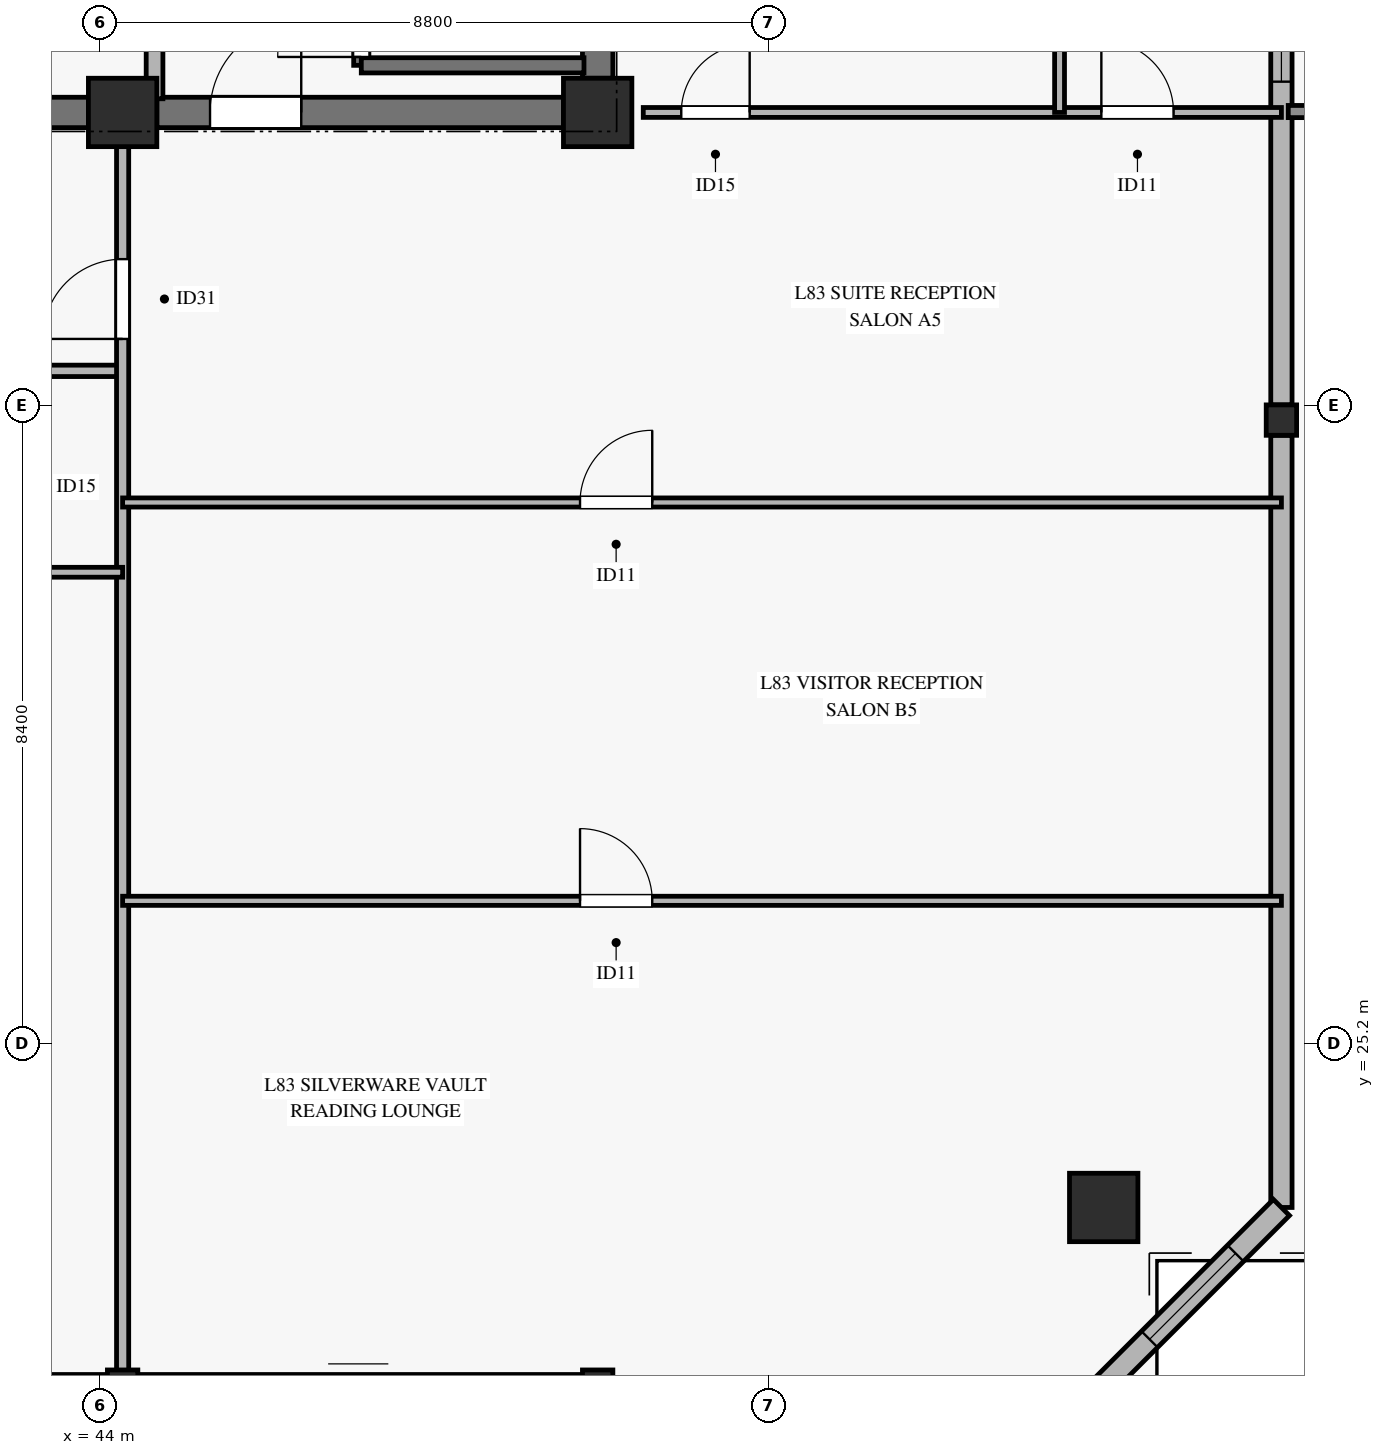
"""IFC4 building model, lengths in metres.
Left out: names, types, materials, properties, quantities, classifications, styles, units other than length and angle.
Written with IfcOpenShell. Run it as: python <this file> out.ifc"""

import sys

from ifc_helpers import new_model, si_unit, direction, frame, frame_2d, origin, origin_2d, place, context, subcontext, project, spatial, rectangle, hollow_rectangle, extrude, source, transform, mapped, element, fill, save


model = new_model("IFC4")
c1 = context("Model", 3, precision=1e-05, world=origin(), true_north=direction((0.0, 1.0)))
c2 = subcontext(c1, "Body", "Model", "MODEL_VIEW")
j1 = project(units=[si_unit("LENGTHUNIT", "METRE"), si_unit("PLANEANGLEUNIT", "RADIAN")], contexts=[c1])
p1 = place(None, origin())
s1 = spatial("IfcSite", under=j1, at=p1, CompositionType="ELEMENT")
p2 = place(p1, origin())
s2 = spatial("IfcBuilding", under=s1, at=p2, CompositionType="ELEMENT")
p3 = place(p2, frame((0.0, 0.0, 321.0)))
s3 = spatial("IfcBuildingStorey", under=s2, at=p3, CompositionType="ELEMENT", Elevation=321.0)
m1 = source(origin(), c2, "Body", "SweptSolid", [
    extrude(rectangle(XDim=0.9, YDim=0.9, at=origin_2d()), origin(), (0.0, 0.0, 1.0), 3.185),
])
for number, where, z_axis, x_axis in (
    (1, (44.3, 37.45, 0.0), (0.0, 0.0, 1.0), (1.0, 0.0, 0.0)),
    (2, (50.55, 37.45, 0.0), (0.0, 0.0, 1.0), (1.0, 0.0, 0.0)),
):
    element("IfcColumn", number, at=place(p3, frame(where, z_axis=z_axis, x_axis=x_axis)), inside=s3, PredefinedType="PILASTER", context=c2, shape_type="MappedRepresentation", body=[
        mapped(m1, transform((0.0, 0.0, 0.0), x_axis=(1.0, 0.0, 0.0), y_axis=(0.0, 1.0, 0.0), z_axis=(0.0, 0.0, 1.0), scale=1.0)),
    ])
p4 = place(p3, frame((36.05, 37.45, 0.0), z_axis=(0.0, 0.0, 1.0), x_axis=(1.0, 0.0, 0.0)))
e3 = element("IfcWall", 3, at=p4, inside=s3, PredefinedType="SHEAR", context=c2, shape_type="SweptSolid", body=[
    extrude(rectangle(XDim=7.8, YDim=0.4, at=frame_2d((3.9, 0.0))), origin(), (0.0, 0.0, 1.0), 3.185),
])
p5 = place(p3, frame((44.75, 37.45, 0.0), z_axis=(0.0, 0.0, 1.0), x_axis=(1.0, 0.0, 0.0)))
e4 = element("IfcWall", 4, at=p5, inside=s3, PredefinedType="SHEAR", context=c2, shape_type="SweptSolid", body=[
    extrude(rectangle(XDim=5.35, YDim=0.4, at=frame_2d((2.675, 0.0))), origin(), (0.0, 0.0, 1.0), 3.185),
])
p6 = place(p5, frame((0.7, 0.0, 0.0)))
e5 = element("IfcOpeningElement", 5, at=p6, cuts=e4, PredefinedType="OPENING", context=c2, shape_type="SweptSolid", body=[
    extrude(rectangle(XDim=1.2, YDim=2.15, at=frame_2d((0.6, 1.075))), frame((0.0, 0.21, 0.0), z_axis=(0.0, -1.0, 0.0), x_axis=(1.0, 0.0, 0.0)), (0.0, 0.0, 1.0), 0.42),
])
p7 = place(p3, frame((50.55, 37.9, 0.0), z_axis=(0.0, 0.0, 1.0), x_axis=(0.0, 1.0, 0.0)))
e6 = element("IfcWall", 6, at=p7, inside=s3, PredefinedType="SHEAR", context=c2, shape_type="SweptSolid", body=[
    extrude(rectangle(XDim=8.2, YDim=0.4, at=frame_2d((4.1, 0.0))), origin(), (0.0, 0.0, 1.0), 3.185),
])
m2 = source(origin(), c2, "Body", "SweptSolid", [
    extrude(hollow_rectangle(XDim=0.9, YDim=0.9, WallThickness=0.04, at=origin_2d()), origin(), (0.0, 0.0, 1.0), 3.326),
])
p8 = place(p3, frame((57.208, 23.042, 0.0), z_axis=(-0.110896020197, 0.266341268892, 0.957478146586), x_axis=(-0.92317473482, -0.384380552305, 0.0)))
e7 = element("IfcColumn", 7, at=p8, inside=s3, PredefinedType="COLUMN", context=c2, shape_type="MappedRepresentation", body=[
    mapped(m2, transform((0.0, 0.0, 0.0), x_axis=(1.0, 0.0, 0.0), y_axis=(0.0, 1.0, 0.0), z_axis=(0.0, 0.0, 1.0), scale=1.0)),
])
m3 = source(origin(), c2, "Body", "SweptSolid", [
    extrude(hollow_rectangle(XDim=0.4, YDim=0.4, WallThickness=0.02, at=origin_2d()), origin(), (0.0, 0.0, 1.0), 3.319),
])
for number, where, z_axis, x_axis in (
    (8, (44.3, 20.704, 0.0), (0.0, 0.281, 0.96), (-1.0, 0.0, 0.0)),
    (9, (50.55, 20.704, 0.0), (0.0, 0.281, 0.96), (-1.0, 0.0, 0.0)),
):
    element("IfcColumn", number, at=place(p3, frame(where, z_axis=z_axis, x_axis=x_axis)), inside=s3, PredefinedType="COLUMN", context=c2, shape_type="MappedRepresentation", body=[
        mapped(m3, transform((0.0, 0.0, 0.0), x_axis=(1.0, 0.0, 0.0), y_axis=(0.0, 1.0, 0.0), z_axis=(0.0, 0.0, 1.0), scale=1.0)),
    ])
m4 = source(origin(), c2, "Body", "SweptSolid", [
    extrude(hollow_rectangle(XDim=0.4, YDim=0.4, WallThickness=0.02, at=origin_2d()), origin(), (0.0, 0.0, 1.0), 3.246),
])
p9 = place(p3, frame((59.546, 33.402, 0.0), z_axis=(-0.127803916057, 0.143525527862, 0.981359557906), x_axis=(-0.746825952664, -0.665019545899, 0.0)))
e10 = element("IfcColumn", 10, at=p9, inside=s3, PredefinedType="COLUMN", context=c2, shape_type="MappedRepresentation", body=[
    mapped(m4, transform((0.0, 0.0, 0.0), x_axis=(1.0, 0.0, 0.0), y_axis=(0.0, 1.0, 0.0), z_axis=(0.0, 0.0, 1.0), scale=1.0)),
])
p10 = place(p3, frame((37.75, 20.704, 0.0), z_axis=(0.0, 0.0, 1.0), x_axis=(1.0, 0.0, 0.0)))
e11 = element("IfcWall", 11, at=p10, inside=s3, PredefinedType="SOLIDWALL", context=c2, shape_type="SweptSolid", body=[
    extrude(rectangle(XDim=6.35, YDim=0.28, at=frame_2d((3.175, 0.0))), origin(), (0.0, 0.0, 1.0), 2.815),
])
p11 = place(p3, frame((44.5, 20.704, 0.0), z_axis=(0.0, 0.0, 1.0), x_axis=(1.0, 0.0, 0.0)))
e12 = element("IfcWall", 12, at=p11, inside=s3, PredefinedType="SOLIDWALL", context=c2, shape_type="SweptSolid", body=[
    extrude(rectangle(XDim=5.85, YDim=0.28, at=frame_2d((2.925, 0.0))), origin(), (0.0, 0.0, 1.0), 2.815),
])
p12 = place(p11, frame((2.0, 0.0, 0.0)))
e13 = element("IfcOpeningElement", 13, at=p12, cuts=e12, PredefinedType="OPENING", context=c2, shape_type="SweptSolid", body=[
    extrude(rectangle(XDim=1.8, YDim=2.25, at=frame_2d((0.9, 1.125))), frame((0.0, 0.15, 0.0), z_axis=(0.0, -1.0, 0.0), x_axis=(1.0, 0.0, 0.0)), (0.0, 0.0, 1.0), 0.3),
])
p13 = place(p3, frame((59.546, 23.042, 0.0), z_axis=(0.0, 0.0, 1.0), x_axis=(0.0, 1.0, 0.0)))
e14 = element("IfcWall", 14, at=p13, inside=s3, PredefinedType="SOLIDWALL", context=c2, shape_type="SweptSolid", body=[
    extrude(rectangle(XDim=10.16, YDim=0.28, at=frame_2d((5.08, 0.0))), origin(), (0.0, 0.0, 1.0), 2.815),
])
p14 = place(p3, frame((59.546, 33.602, 0.0), z_axis=(0.0, 0.0, 1.0), x_axis=(0.0, 1.0, 0.0)))
e15 = element("IfcWall", 15, at=p14, inside=s3, PredefinedType="SOLIDWALL", context=c2, shape_type="SweptSolid", body=[
    extrude(rectangle(XDim=10.16, YDim=0.28, at=frame_2d((5.08, 0.0))), origin(), (0.0, 0.0, 1.0), 2.815),
])
p15 = place(p14, frame((4.253, 0.0, 0.45)))
e16 = element("IfcOpeningElement", 16, at=p15, cuts=e15, PredefinedType="OPENING", context=c2, shape_type="SweptSolid", body=[
    extrude(rectangle(XDim=2.2, YDim=2.1, at=frame_2d((1.1, 1.05))), frame((0.0, 0.15, 0.0), z_axis=(0.0, -1.0, 0.0), x_axis=(1.0, 0.0, 0.0)), (0.0, 0.0, 1.0), 0.3),
])
p16 = place(p3, frame((57.208, 20.704, 0.0), z_axis=(0.0, 0.0, 1.0), x_axis=(0.707106781187, 0.707106781187, 0.0)))
e17 = element("IfcWall", 17, at=p16, inside=s3, PredefinedType="SOLIDWALL", context=c2, shape_type="SweptSolid", body=[
    extrude(rectangle(XDim=3.306, YDim=0.3, at=frame_2d((1.653, 0.0))), origin(), (0.0, 0.0, 1.0), 2.815),
])
p17 = place(p16, frame((0.853, 0.0, 0.45)))
e18 = element("IfcOpeningElement", 18, at=p17, cuts=e17, PredefinedType="OPENING", context=c2, shape_type="SweptSolid", body=[
    extrude(rectangle(XDim=1.6, YDim=2.0, at=frame_2d((0.8, 1.0))), frame((0.0, 0.16, 0.0), z_axis=(0.0, -1.0, 0.0), x_axis=(1.0, 0.0, 0.0)), (0.0, 0.0, 1.0), 0.32),
])
p18 = place(p3, frame((47.44, 38.07, 0.0), z_axis=(0.0, 0.0, 1.0), x_axis=(0.0, 1.0, 0.0)))
e19 = element("IfcWall", 19, at=p18, inside=s3, PredefinedType="SOLIDWALL", context=c2, shape_type="SweptSolid", body=[
    extrude(rectangle(XDim=7.25, YDim=0.2, at=frame_2d((3.625, 0.0))), origin(), (0.0, 0.0, 1.0), 3.4),
])
p19 = place(p18, frame((0.11, 0.0, 0.0)))
e20 = element("IfcOpeningElement", 20, at=p19, cuts=e19, PredefinedType="OPENING", context=c2, shape_type="SweptSolid", body=[
    extrude(rectangle(XDim=1.1, YDim=2.15, at=frame_2d((0.55, 1.075))), frame((0.0, 0.11, 0.0), z_axis=(0.0, -1.0, 0.0), x_axis=(1.0, 0.0, 0.0)), (0.0, 0.0, 1.0), 0.22),
])
p20 = place(p3, frame((47.44, 38.07, 0.0), z_axis=(0.0, 0.0, 1.0), x_axis=(1.0, 0.0, 0.0)))
e21 = element("IfcWall", 21, at=p20, inside=s3, PredefinedType="SOLIDWALL", context=c2, shape_type="SweptSolid", body=[
    extrude(rectangle(XDim=2.93, YDim=0.2, at=frame_2d((1.465, 0.0))), origin(), (0.0, 0.0, 1.0), 3.4),
])
p21 = place(p3, frame((44.72, 37.63, 0.0), z_axis=(0.0, 0.0, 1.0), x_axis=(0.0, 1.0, 0.0)))
e22 = element("IfcWall", 22, at=p21, inside=s3, PredefinedType="SOLIDWALL", context=c2, shape_type="SweptSolid", body=[
    extrude(rectangle(XDim=7.59, YDim=0.22, at=frame_2d((3.795, 0.0))), origin(), (0.0, 0.0, 1.0), 3.185),
])
p22 = place(p3, frame((23.4, 34.05, 0.0), z_axis=(0.0, 0.0, 1.0), x_axis=(1.0, 0.0, 0.0)))
e23 = element("IfcWall", 23, at=p22, inside=s3, PredefinedType="PARTITIONING", context=c2, shape_type="SweptSolid", body=[
    extrude(rectangle(XDim=20.9, YDim=0.15, at=frame_2d((10.45, 0.0))), origin(), (0.0, 0.0, 1.0), 2.47),
])
p23 = place(p22, frame((3.275, 0.0, 0.0)))
e24 = element("IfcOpeningElement", 24, at=p23, cuts=e23, PredefinedType="OPENING", context=c2, shape_type="SweptSolid", body=[
    extrude(rectangle(XDim=1.05, YDim=2.15, at=frame_2d((0.525, 1.075))), frame((0.0, 0.085, 0.0), z_axis=(0.0, -1.0, 0.0), x_axis=(1.0, 0.0, 0.0)), (0.0, 0.0, 1.0), 0.17),
])
p24 = place(p22, frame((10.775, 0.0, 0.0)))
e25 = element("IfcOpeningElement", 25, at=p24, cuts=e23, PredefinedType="OPENING", context=c2, shape_type="SweptSolid", body=[
    extrude(rectangle(XDim=1.05, YDim=2.15, at=frame_2d((0.525, 1.075))), frame((0.0, 0.085, 0.0), z_axis=(0.0, -1.0, 0.0), x_axis=(1.0, 0.0, 0.0)), (0.0, 0.0, 1.0), 0.17),
])
p25 = place(p22, frame((17.525, 0.0, 0.0)))
e26 = element("IfcOpeningElement", 26, at=p25, cuts=e23, PredefinedType="OPENING", context=c2, shape_type="SweptSolid", body=[
    extrude(rectangle(XDim=1.05, YDim=2.15, at=frame_2d((0.525, 1.075))), frame((0.0, 0.085, 0.0), z_axis=(0.0, -1.0, 0.0), x_axis=(1.0, 0.0, 0.0)), (0.0, 0.0, 1.0), 0.17),
])
p26 = place(p3, frame((44.3, 20.704, 0.0), z_axis=(0.0, 0.0, 1.0), x_axis=(0.0, 1.0, 0.0)))
e27 = element("IfcWall", 27, at=p26, inside=s3, PredefinedType="PARTITIONING", context=c2, shape_type="SweptSolid", body=[
    extrude(rectangle(XDim=16.746, YDim=0.16, at=frame_2d((8.373, 0.0))), origin(), (0.0, 0.0, 1.0), 2.47),
])
p27 = place(p26, frame((13.766, 0.0, 0.0)))
e28 = element("IfcOpeningElement", 28, at=p27, cuts=e27, PredefinedType="OPENING", context=c2, shape_type="SweptSolid", body=[
    extrude(rectangle(XDim=1.05, YDim=2.15, at=frame_2d((0.525, 1.075))), frame((0.0, 0.09, 0.0), z_axis=(0.0, -1.0, 0.0), x_axis=(1.0, 0.0, 0.0)), (0.0, 0.0, 1.0), 0.18),
])
p28 = place(p3, frame((42.72, 31.4, 0.0), z_axis=(0.0, 0.0, 1.0), x_axis=(1.0, 0.0, 0.0)))
e29 = element("IfcWall", 29, at=p28, inside=s3, PredefinedType="PARTITIONING", context=c2, shape_type="SweptSolid", body=[
    extrude(rectangle(XDim=1.58, YDim=0.13, at=frame_2d((0.79, 0.0))), origin(), (0.0, 0.0, 1.0), 2.47),
])
p29 = place(p3, frame((44.3, 27.077, 0.0), z_axis=(0.0, 0.0, 1.0), x_axis=(1.0, 0.0, 0.0)))
e30 = element("IfcWall", 30, at=p29, inside=s3, PredefinedType="PARTITIONING", context=c2, shape_type="SweptSolid", body=[
    extrude(rectangle(XDim=15.246, YDim=0.12, at=frame_2d((7.623, 0.0))), origin(), (0.0, 0.0, 1.0), 2.47),
])
p30 = place(p29, frame((6.018, 0.0, 0.0)))
e31 = element("IfcOpeningElement", 31, at=p30, cuts=e30, PredefinedType="OPENING", context=c2, shape_type="SweptSolid", body=[
    extrude(rectangle(XDim=0.95, YDim=2.1, at=frame_2d((0.475, 1.05))), frame((0.0, 0.07, 0.0), z_axis=(0.0, -1.0, 0.0), x_axis=(1.0, 0.0, 0.0)), (0.0, 0.0, 1.0), 0.14),
])
p31 = place(p3, frame((44.3, 32.318, 0.0), z_axis=(0.0, 0.0, 1.0), x_axis=(1.0, 0.0, 0.0)))
e32 = element("IfcWall", 32, at=p31, inside=s3, PredefinedType="PARTITIONING", context=c2, shape_type="SweptSolid", body=[
    extrude(rectangle(XDim=15.246, YDim=0.12, at=frame_2d((7.623, 0.0))), origin(), (0.0, 0.0, 1.0), 2.47),
])
p32 = place(p31, frame((6.018, 0.0, 0.0)))
e33 = element("IfcOpeningElement", 33, at=p32, cuts=e32, PredefinedType="OPENING", context=c2, shape_type="SweptSolid", body=[
    extrude(rectangle(XDim=0.95, YDim=2.1, at=frame_2d((0.475, 1.05))), frame((0.0, 0.07, 0.0), z_axis=(0.0, -1.0, 0.0), x_axis=(1.0, 0.0, 0.0)), (0.0, 0.0, 1.0), 0.14),
])
p33 = place(p3, frame((51.15, 37.45, 0.0), z_axis=(0.0, 0.0, 1.0), x_axis=(1.0, 0.0, 0.0)))
e34 = element("IfcWall", 34, at=p33, inside=s3, PredefinedType="PARTITIONING", context=c2, shape_type="SweptSolid", body=[
    extrude(rectangle(XDim=8.396, YDim=0.13, at=frame_2d((4.198, 0.0))), origin(), (0.0, 0.0, 1.0), 2.82),
])
p34 = place(p33, frame((0.5, 0.0, 0.0)))
e35 = element("IfcOpeningElement", 35, at=p34, cuts=e34, PredefinedType="OPENING", context=c2, shape_type="SweptSolid", body=[
    extrude(rectangle(XDim=0.9, YDim=2.1, at=frame_2d((0.45, 1.05))), frame((0.0, 0.075, 0.0), z_axis=(0.0, -1.0, 0.0), x_axis=(1.0, 0.0, 0.0)), (0.0, 0.0, 1.0), 0.15),
])
p35 = place(p33, frame((6.027, 0.0, 0.0)))
e36 = element("IfcOpeningElement", 36, at=p35, cuts=e34, PredefinedType="OPENING", context=c2, shape_type="SweptSolid", body=[
    extrude(rectangle(XDim=0.95, YDim=2.1, at=frame_2d((0.475, 1.05))), frame((0.0, 0.075, 0.0), z_axis=(0.0, -1.0, 0.0), x_axis=(1.0, 0.0, 0.0)), (0.0, 0.0, 1.0), 0.15),
])
p36 = place(p3, frame((56.627, 37.45, 0.0), z_axis=(0.0, 0.0, 1.0), x_axis=(0.0, 1.0, 0.0)))
e37 = element("IfcWall", 37, at=p36, inside=s3, PredefinedType="PARTITIONING", context=c2, shape_type="SweptSolid", body=[
    extrude(rectangle(XDim=8.8, YDim=0.13, at=frame_2d((4.4, 0.0))), origin(), (0.0, 0.0, 1.0), 3.185),
])
m5 = source(origin(), c2, "Body", "SweptSolid", [
    extrude(rectangle(XDim=2.2, YDim=2.1, at=frame_2d((1.1, 1.05))), frame((0.0, 0.03, 0.0), z_axis=(0.0, -1.0, 0.0), x_axis=(1.0, 0.0, 0.0)), (0.0, 0.0, 1.0), 0.06),
])
p37 = place(p15, origin())
e38 = element("IfcWindow", 38, at=p37, inside=s3, PartitioningType="SINGLE_PANEL", PredefinedType="WINDOW", context=c2, shape_type="MappedRepresentation", body=[
    mapped(m5, transform((0.0, 0.0, 0.0), x_axis=(1.0, 0.0, 0.0), y_axis=(0.0, 1.0, 0.0), z_axis=(0.0, 0.0, 1.0), scale=1.0)),
])
fill(e16, e38)
m6 = source(origin(), c2, "Body", "SweptSolid", [
    extrude(rectangle(XDim=1.6, YDim=2.0, at=frame_2d((0.8, 1.0))), frame((0.0, 0.03, 0.0), z_axis=(0.0, -1.0, 0.0), x_axis=(1.0, 0.0, 0.0)), (0.0, 0.0, 1.0), 0.06),
])
p38 = place(p17, origin())
e39 = element("IfcWindow", 39, at=p38, inside=s3, PartitioningType="SINGLE_PANEL", PredefinedType="WINDOW", context=c2, shape_type="MappedRepresentation", body=[
    mapped(m6, transform((0.0, 0.0, 0.0), x_axis=(1.0, 0.0, 0.0), y_axis=(0.0, 1.0, 0.0), z_axis=(0.0, 0.0, 1.0), scale=1.0)),
])
fill(e18, e39)
m7 = source(origin(), c2, "Body", "SweptSolid", [
    extrude(rectangle(XDim=1.1, YDim=2.15, at=frame_2d((0.55, 1.075))), frame((0.0, 0.025, 0.0), z_axis=(0.0, -1.0, 0.0), x_axis=(1.0, 0.0, 0.0)), (0.0, 0.0, 1.0), 0.05),
])
p39 = place(p19, origin())
e40 = element("IfcDoor", 40, at=p39, inside=s3, OperationType="SINGLE_SWING_LEFT", PredefinedType="DOOR", context=c2, shape_type="MappedRepresentation", body=[
    mapped(m7, transform((0.0, 0.0, 0.0), x_axis=(1.0, 0.0, 0.0), y_axis=(0.0, 1.0, 0.0), z_axis=(0.0, 0.0, 1.0), scale=1.0)),
])
fill(e20, e40)
m8 = source(origin(), c2, "Body", "SweptSolid", [
    extrude(rectangle(XDim=1.2, YDim=2.15, at=frame_2d((0.6, 1.075))), frame((0.0, 0.025, 0.0), z_axis=(0.0, -1.0, 0.0), x_axis=(1.0, 0.0, 0.0)), (0.0, 0.0, 1.0), 0.05),
])
p40 = place(p6, origin())
e41 = element("IfcDoor", 41, at=p40, inside=s3, OperationType="SINGLE_SWING_RIGHT", PredefinedType="DOOR", context=c2, shape_type="MappedRepresentation", body=[
    mapped(m8, transform((0.0, 0.0, 0.0), x_axis=(1.0, 0.0, 0.0), y_axis=(0.0, 1.0, 0.0), z_axis=(0.0, 0.0, 1.0), scale=1.0)),
])
fill(e5, e41)
m9 = source(origin(), c2, "Body", "SweptSolid", [
    extrude(rectangle(XDim=1.05, YDim=2.15, at=frame_2d((0.525, 1.075))), frame((0.0, 0.025, 0.0), z_axis=(0.0, -1.0, 0.0), x_axis=(1.0, 0.0, 0.0)), (0.0, 0.0, 1.0), 0.05),
])
p41 = place(p27, origin())
e42 = element("IfcDoor", 42, at=p41, inside=s3, OperationType="SINGLE_SWING_LEFT", PredefinedType="DOOR", context=c2, shape_type="MappedRepresentation", body=[
    mapped(m9, transform((0.0, 0.0, 0.0), x_axis=(1.0, 0.0, 0.0), y_axis=(0.0, 1.0, 0.0), z_axis=(0.0, 0.0, 1.0), scale=1.0)),
])
fill(e28, e42)
m10 = source(origin(), c2, "Body", "SweptSolid", [
    extrude(rectangle(XDim=0.95, YDim=2.1, at=frame_2d((0.475, 1.05))), frame((0.0, 0.025, 0.0), z_axis=(0.0, -1.0, 0.0), x_axis=(1.0, 0.0, 0.0)), (0.0, 0.0, 1.0), 0.05),
])
p42 = place(p32, origin())
e43 = element("IfcDoor", 43, at=p42, inside=s3, OperationType="SINGLE_SWING_RIGHT", PredefinedType="DOOR", context=c2, shape_type="MappedRepresentation", body=[
    mapped(m10, transform((0.0, 0.0, 0.0), x_axis=(1.0, 0.0, 0.0), y_axis=(0.0, 1.0, 0.0), z_axis=(0.0, 0.0, 1.0), scale=1.0)),
])
fill(e33, e43)
p43 = place(p30, origin())
e44 = element("IfcDoor", 44, at=p43, inside=s3, OperationType="SINGLE_SWING_LEFT", PredefinedType="DOOR", context=c2, shape_type="MappedRepresentation", body=[
    mapped(m10, transform((0.0, 0.0, 0.0), x_axis=(1.0, 0.0, 0.0), y_axis=(0.0, 1.0, 0.0), z_axis=(0.0, 0.0, 1.0), scale=1.0)),
])
fill(e31, e44)
m11 = source(origin(), c2, "Body", "SweptSolid", [
    extrude(rectangle(XDim=0.9, YDim=2.1, at=frame_2d((0.45, 1.05))), frame((0.0, 0.025, 0.0), z_axis=(0.0, -1.0, 0.0), x_axis=(1.0, 0.0, 0.0)), (0.0, 0.0, 1.0), 0.05),
])
p44 = place(p34, origin())
e45 = element("IfcDoor", 45, at=p44, inside=s3, OperationType="SINGLE_SWING_RIGHT", PredefinedType="DOOR", context=c2, shape_type="MappedRepresentation", body=[
    mapped(m11, transform((0.0, 0.0, 0.0), x_axis=(1.0, 0.0, 0.0), y_axis=(0.0, 1.0, 0.0), z_axis=(0.0, 0.0, 1.0), scale=1.0)),
])
fill(e35, e45)
p45 = place(p35, origin())
e46 = element("IfcDoor", 46, at=p45, inside=s3, OperationType="SINGLE_SWING_LEFT", PredefinedType="DOOR", context=c2, shape_type="MappedRepresentation", body=[
    mapped(m10, transform((0.0, 0.0, 0.0), x_axis=(1.0, 0.0, 0.0), y_axis=(0.0, 1.0, 0.0), z_axis=(0.0, 0.0, 1.0), scale=1.0)),
])
fill(e36, e46)
save(model, sys.argv[1])
